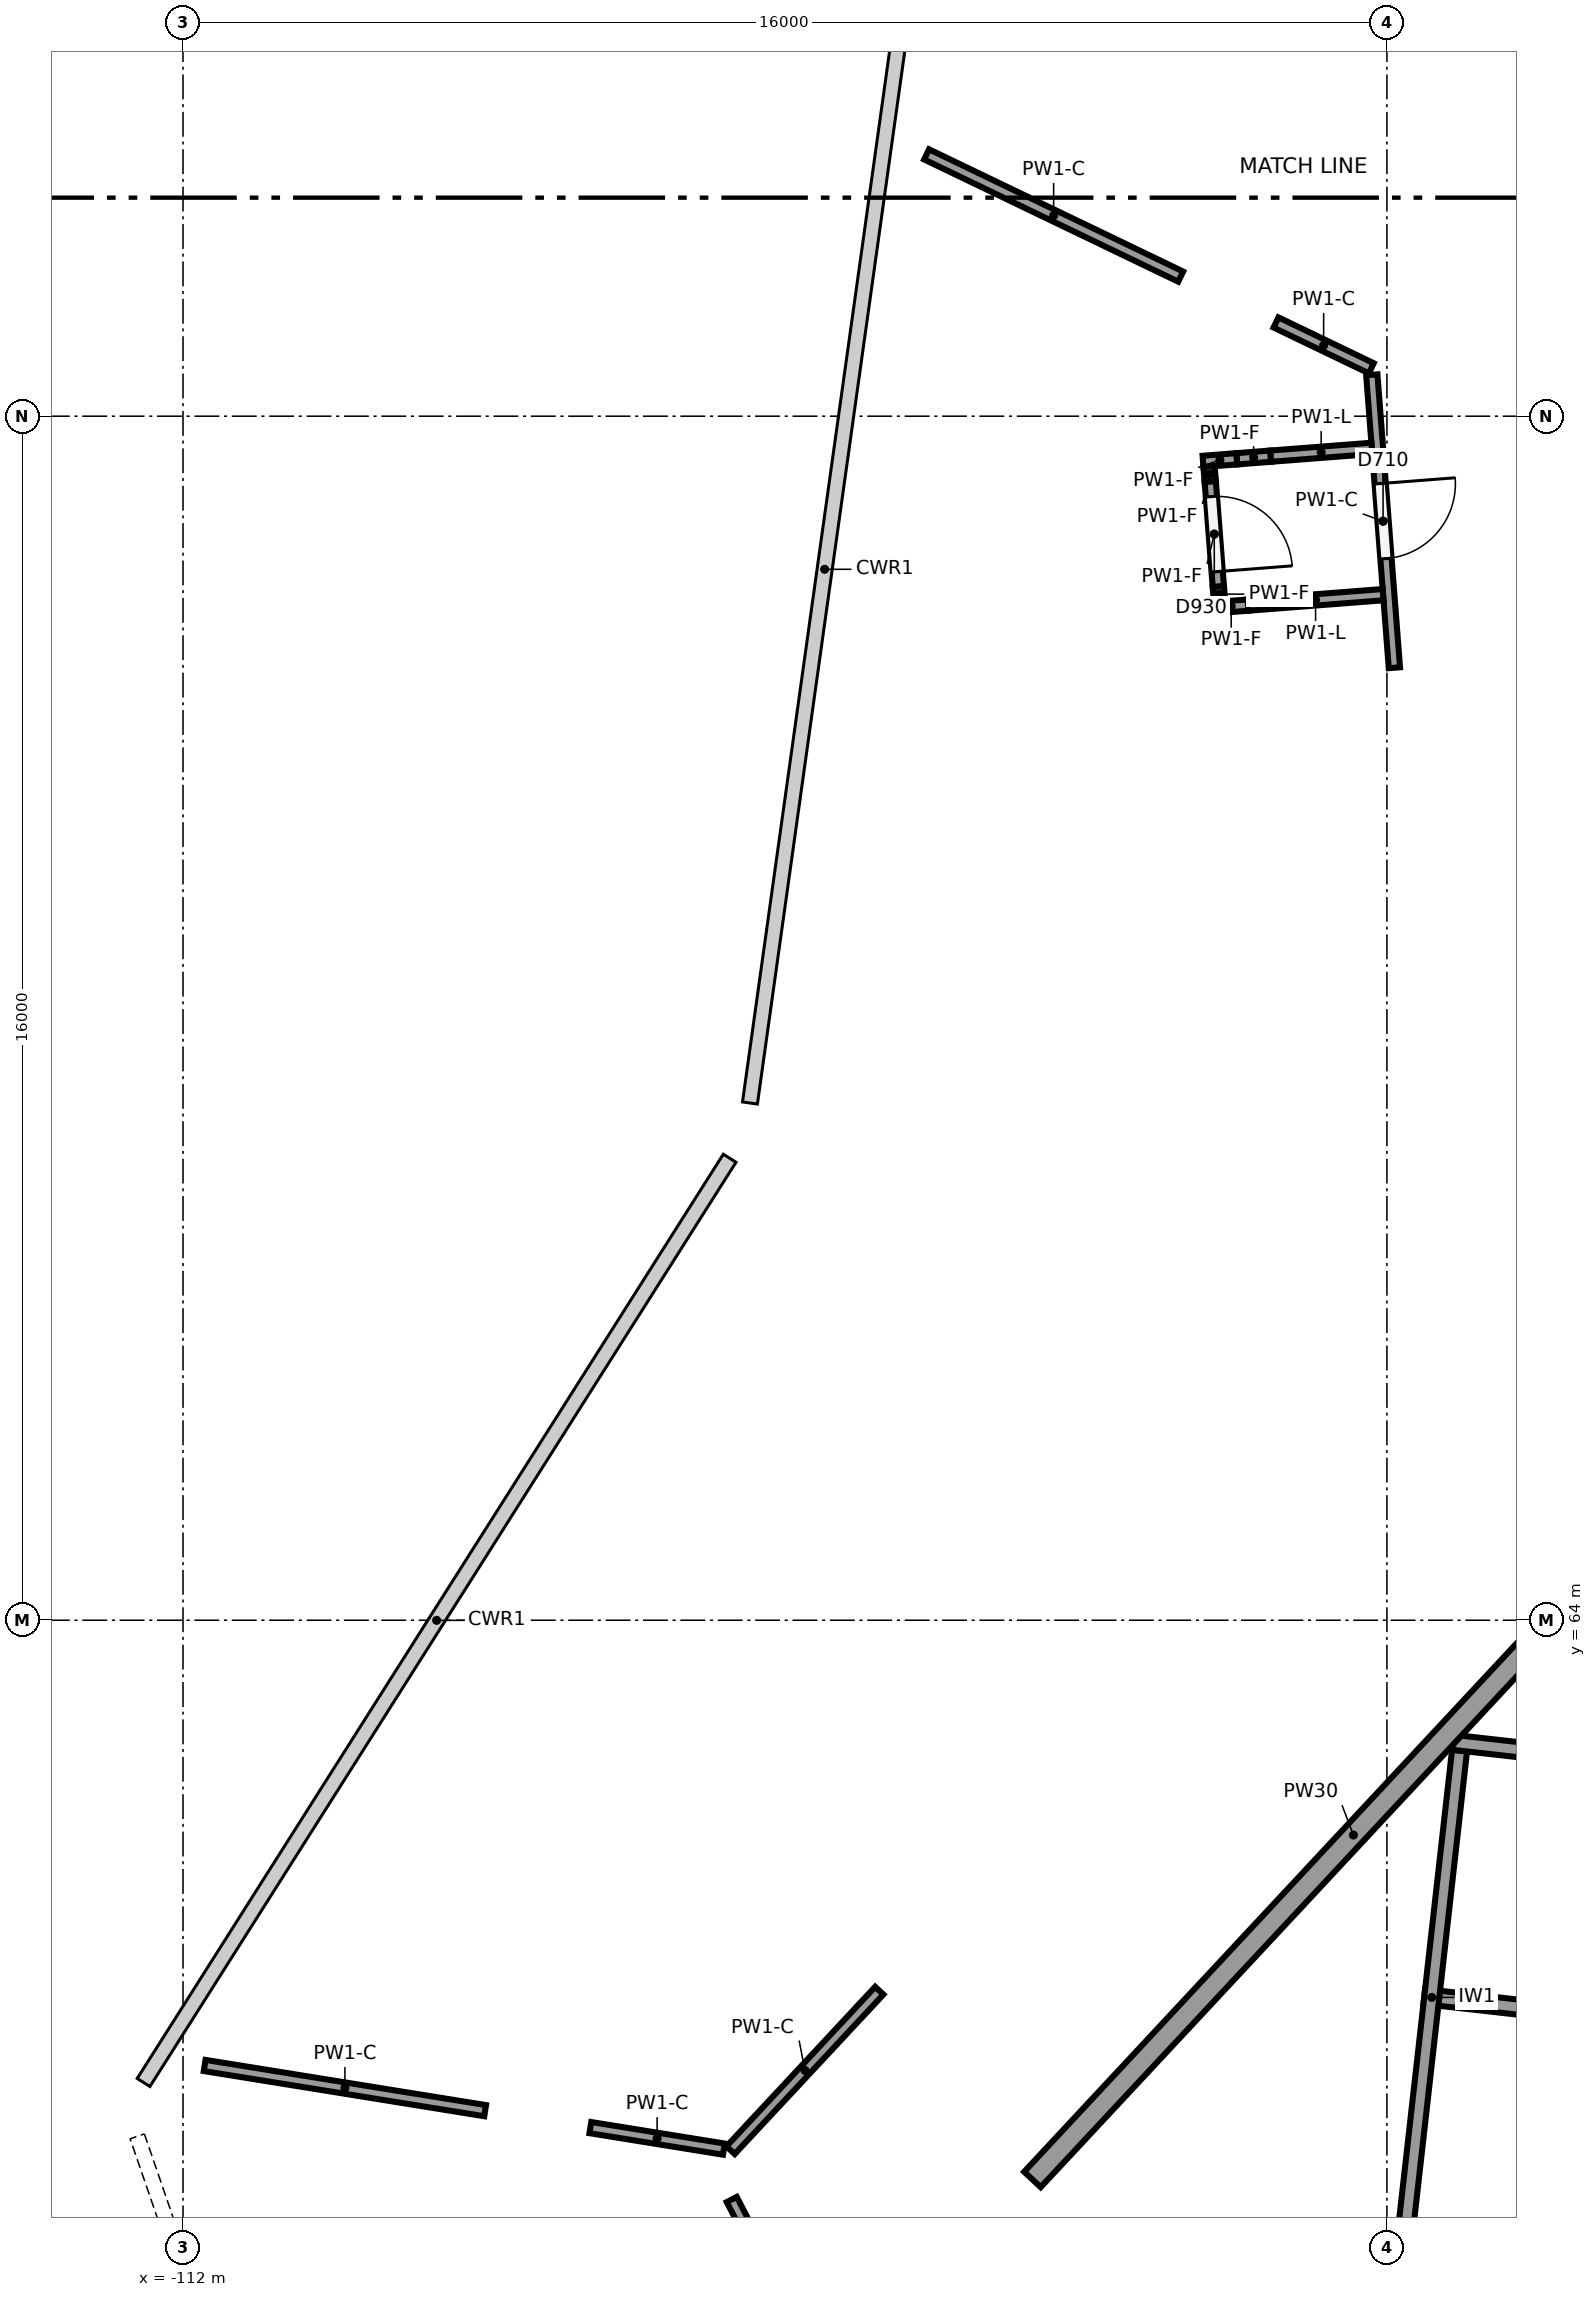
"""IFC4 building model, lengths in metres.
Left out: names, types, materials, properties, quantities, classifications, styles, units other than length and angle.
Written with IfcOpenShell. Run it as: python <this file> out.ifc"""

import sys

from ifc_helpers import new_model, si_unit, direction, frame, frame_2d, origin, origin_2d, place, context, subcontext, project, spatial, rectangle, circle, extrude, element, fill, save


model = new_model("IFC4")
c1 = context("Model", 3, precision=1e-05, world=origin(), true_north=direction((0.0, 1.0)))
c2 = subcontext(c1, "Body", "Model", "MODEL_VIEW")
j1 = project(units=[si_unit("LENGTHUNIT", "METRE"), si_unit("PLANEANGLEUNIT", "RADIAN")], contexts=[c1])
p1 = place(None, origin())
s1 = spatial("IfcSite", under=j1, at=p1, CompositionType="ELEMENT")
p2 = place(p1, origin())
s2 = spatial("IfcBuilding", under=s1, at=p2, CompositionType="ELEMENT")
p3 = place(p2, frame((0.0, 0.0, 12.0)))
s3 = spatial("IfcBuildingStorey", under=s2, at=p3, CompositionType="ELEMENT", Elevation=12.0)
p4 = place(p3, frame((-101.052, 56.203, 0.0), z_axis=(0.0, 0.0, 1.0), x_axis=(1.0, 0.0, 0.0)))
e1 = element("IfcColumn", 1, at=p4, inside=s3, PredefinedType="COLUMN", context=c2, shape_type="SweptSolid", body=[
    extrude(circle(Radius=0.5, at=origin_2d()), origin(), (0.0, 0.0, 1.0), 6.0),
])
for number, where, z_axis, x_axis in (
    (2, (-95.38, 81.028, 0.0), (0.0, 0.0, 1.0), (1.0, 0.0, 0.0)),
    (3, (-97.852, 82.581, 0.0), (0.0, 0.0, 1.0), (1.0, 0.0, 0.0)),
    (4, (-95.648, 67.373, 0.0), (0.0, 0.0, 1.0), (1.0, 0.0, 0.0)),
    (5, (-99.424, 68.694, 0.0), (0.0, 0.0, 1.0), (1.0, 0.0, 0.0)),
    (6, (-104.521, 70.477, 0.0), (0.0, 0.0, 1.0), (1.0, 0.0, 0.0)),
    (7, (-104.212, 56.559, 0.0), (0.0, 0.0, 1.0), (1.0, 0.0, 0.0)),
    (8, (-107.372, 56.915, 0.0), (0.0, 0.0, 1.0), (1.0, 0.0, 0.0)),
    (9, (-112.738, 57.52, 0.0), (0.0, 0.0, 1.0), (1.0, 0.0, 0.0)),
):
    element("IfcColumn", number, at=place(p3, frame(where, z_axis=z_axis, x_axis=x_axis)), inside=s3, PredefinedType="COLUMN", context=c2, shape_type="SweptSolid", body=[
        extrude(circle(Radius=0.4, at=origin_2d()), origin(), (0.0, 0.0, 1.0), 6.0),
    ])
p5 = place(p3, frame((-100.711, 56.568, 0.0), z_axis=(0.0, 0.0, 1.0), x_axis=(0.681794658463, 0.731543603411, 0.0)))
e10 = element("IfcWall", 10, at=p5, inside=s3, PredefinedType="SOLIDWALL", context=c2, shape_type="SweptSolid", body=[
    extrude(rectangle(XDim=12.514, YDim=0.3, at=frame_2d((6.257, 0.0))), origin(), (0.0, 0.0, 1.0), 4.35),
])
p6 = place(p3, frame((-95.123, 62.378, 0.0), z_axis=(0.0, 0.0, 1.0), x_axis=(0.993710792168, -0.111977058046, 0.0)))
e11 = element("IfcWall", 11, at=p6, inside=s3, PredefinedType="SHEAR", context=c2, shape_type="SweptSolid", body=[
    extrude(rectangle(XDim=8.2, YDim=0.2, at=frame_2d((4.1, 0.0))), origin(), (0.0, 0.0, 1.0), 5.65),
])
p7 = place(p3, frame((-95.035, 62.267, 0.0), z_axis=(0.0, 0.0, 1.0), x_axis=(-0.111933579504, -0.993715690617, 0.0)))
e12 = element("IfcWall", 12, at=p7, inside=s3, PredefinedType="SHEAR", context=c2, shape_type="SweptSolid", body=[
    extrude(rectangle(XDim=6.6, YDim=0.2, at=frame_2d((3.3, 0.0))), origin(), (0.0, 0.0, 1.0), 5.65),
])
p8 = place(p3, frame((-95.504, 58.999, 0.0), z_axis=(0.0, 0.0, 1.0), x_axis=(0.993710792168, -0.111977058046, 0.0)))
e13 = element("IfcWall", 13, at=p8, inside=s3, PredefinedType="SHEAR", context=c2, shape_type="SweptSolid", body=[
    extrude(rectangle(XDim=8.2, YDim=0.2, at=frame_2d((4.1, 0.0))), origin(), (0.0, 0.0, 1.0), 5.65),
])
p9 = place(p3, frame((-102.118, 83.479, 0.0), z_axis=(0.0, 0.0, 1.0), x_axis=(0.901188323719, -0.433427739298, 0.0)))
e14 = element("IfcWall", 14, at=p9, inside=s3, PredefinedType="PARTITIONING", context=c2, shape_type="SweptSolid", body=[
    extrude(rectangle(XDim=3.748, YDim=0.15, at=frame_2d((1.874, 0.0))), origin(), (0.0, 0.0, 1.0), 5.55),
])
p10 = place(p3, frame((-97.474, 81.246, 0.0), z_axis=(0.0, 0.0, 1.0), x_axis=(0.901167600811, -0.433470823988, 0.0)))
e15 = element("IfcWall", 15, at=p10, inside=s3, PredefinedType="PARTITIONING", context=c2, shape_type="SweptSolid", body=[
    extrude(rectangle(XDim=1.405, YDim=0.15, at=frame_2d((0.703, 0.0))), origin(), (0.0, 0.0, 1.0), 5.55),
])
p11 = place(p3, frame((-96.201, 80.55, 0.0), z_axis=(0.0, 0.0, 1.0), x_axis=(0.076969034149, -0.997033483782, 0.0)))
e16 = element("IfcWall", 16, at=p11, inside=s3, PredefinedType="PARTITIONING", context=c2, shape_type="SweptSolid", body=[
    extrude(rectangle(XDim=3.905, YDim=0.15, at=frame_2d((1.952, 0.0))), origin(), (0.0, 0.0, 1.0), 5.55),
])
p12 = place(p11, frame((1.45, 0.0, 0.0)))
e17 = element("IfcOpeningElement", 17, at=p12, cuts=e16, PredefinedType="OPENING", context=c2, shape_type="SweptSolid", body=[
    extrude(rectangle(XDim=1.0, YDim=2.1, at=frame_2d((0.5, 1.05))), frame((0.0, 0.085, 0.0), z_axis=(0.0, -1.0, 0.0), x_axis=(1.0, 0.0, 0.0)), (0.0, 0.0, 1.0), 0.17),
])
p13 = place(p3, frame((-102.747, 59.078, 0.0), z_axis=(0.0, 0.0, 1.0), x_axis=(-0.681777855642, -0.731559263188, 0.0)))
e18 = element("IfcWall", 18, at=p13, inside=s3, PredefinedType="PARTITIONING", context=c2, shape_type="SweptSolid", body=[
    extrude(rectangle(XDim=2.898, YDim=0.15, at=frame_2d((1.449, 0.0))), origin(), (0.0, 0.0, 1.0), 5.55),
])
p14 = place(p3, frame((-104.812, 56.972, 0.0), z_axis=(0.0, 0.0, 1.0), x_axis=(-0.987274842255, 0.159023224248, 0.0)))
e19 = element("IfcWall", 19, at=p14, inside=s3, PredefinedType="PARTITIONING", context=c2, shape_type="SweptSolid", body=[
    extrude(rectangle(XDim=1.798, YDim=0.15, at=frame_2d((0.899, 0.0))), origin(), (0.0, 0.0, 1.0), 5.55),
])
p15 = place(p3, frame((-107.985, 57.483, 0.0), z_axis=(0.0, 0.0, 1.0), x_axis=(-0.987279127288, 0.158996618901, 0.0)))
e20 = element("IfcWall", 20, at=p15, inside=s3, PredefinedType="PARTITIONING", context=c2, shape_type="SweptSolid", body=[
    extrude(rectangle(XDim=3.776, YDim=0.15, at=frame_2d((1.888, 0.0))), origin(), (0.0, 0.0, 1.0), 5.55),
])
p16 = place(p3, frame((-104.707, 56.302, 0.0), z_axis=(0.0, 0.0, 1.0), x_axis=(0.459976248991, -0.887931219388, 0.0)))
e21 = element("IfcWall", 21, at=p16, inside=s3, PredefinedType="PARTITIONING", context=c2, shape_type="SweptSolid", body=[
    extrude(rectangle(XDim=1.944, YDim=0.15, at=frame_2d((0.972, 0.0))), origin(), (0.0, 0.0, 1.0), 5.55),
])
p17 = place(p3, frame((-96.201, 79.573, 0.0), z_axis=(0.0, 0.0, 1.0), x_axis=(-0.997028903068, -0.077028348333, 0.0)))
e22 = element("IfcWall", 22, at=p17, inside=s3, PredefinedType="PARTITIONING", context=c2, shape_type="SweptSolid", body=[
    extrude(rectangle(XDim=1.35, YDim=0.15, at=frame_2d((0.675, 0.0))), origin(), (0.0, 0.0, 1.0), 5.6),
])
p18 = place(p3, frame((-97.547, 79.469, 0.0), z_axis=(0.0, 0.0, 1.0), x_axis=(-0.997070419096, -0.076489080029, 0.0)))
e23 = element("IfcWall", 23, at=p18, inside=s3, PredefinedType="PARTITIONING", context=c2, shape_type="SweptSolid", body=[
    extrude(rectangle(XDim=0.45, YDim=0.15, at=frame_2d((0.225, 0.0))), origin(), (0.0, 0.0, 1.0), 4.3),
])
p19 = place(p3, frame((-97.996, 79.434, 0.0), z_axis=(0.0, 0.0, 1.0), x_axis=(-0.997025681882, -0.077070030935, 0.0)))
e24 = element("IfcWall", 24, at=p19, inside=s3, PredefinedType="PARTITIONING", context=c2, shape_type="SweptSolid", body=[
    extrude(rectangle(XDim=0.45, YDim=0.15, at=frame_2d((0.225, 0.0))), origin(), (0.0, 0.0, 1.0), 4.3),
])
p20 = place(p3, frame((-96.051, 77.628, 0.0), z_axis=(0.0, 0.0, 1.0), x_axis=(-0.997028098262, -0.077038764768, 0.0)))
e25 = element("IfcWall", 25, at=p20, inside=s3, PredefinedType="PARTITIONING", context=c2, shape_type="SweptSolid", body=[
    extrude(rectangle(XDim=1.8, YDim=0.15, at=frame_2d((0.9, 0.0))), origin(), (0.0, 0.0, 1.0), 5.6),
])
p21 = place(p3, frame((-97.845, 77.49, 0.0), z_axis=(0.0, 0.0, 1.0), x_axis=(-0.997028903068, -0.077028348333, 0.0)))
e26 = element("IfcWall", 26, at=p21, inside=s3, PredefinedType="PARTITIONING", context=c2, shape_type="SweptSolid", body=[
    extrude(rectangle(XDim=0.45, YDim=0.15, at=frame_2d((0.225, 0.0))), origin(), (0.0, 0.0, 1.0), 4.3),
])
p22 = place(p3, frame((-98.364, 79.33, 0.0), z_axis=(0.0, 0.0, 1.0), x_axis=(0.076883141957, -0.997040110769, 0.0)))
e27 = element("IfcWall", 27, at=p22, inside=s3, PredefinedType="PARTITIONING", context=c2, shape_type="SweptSolid", body=[
    extrude(rectangle(XDim=0.2, YDim=0.15, at=frame_2d((0.1, 0.0))), origin(), (0.0, 0.0, 1.0), 4.3),
])
p23 = place(p3, frame((-98.348, 79.131, 0.0), z_axis=(0.0, 0.0, 1.0), x_axis=(0.076909879213, -0.997038048662, 0.0)))
e28 = element("IfcWall", 28, at=p23, inside=s3, PredefinedType="PARTITIONING", context=c2, shape_type="SweptSolid", body=[
    extrude(rectangle(XDim=1.4, YDim=0.15, at=frame_2d((0.7, 0.0))), origin(), (0.0, 0.0, 1.0), 4.3),
])
p24 = place(p23, frame((0.2, 0.0, 0.0)))
e29 = element("IfcOpeningElement", 29, at=p24, cuts=e28, PredefinedType="OPENING", context=c2, shape_type="SweptSolid", body=[
    extrude(rectangle(XDim=1.0, YDim=2.1, at=frame_2d((0.5, 1.05))), frame((0.0, 0.085, 0.0), z_axis=(0.0, -1.0, 0.0), x_axis=(1.0, 0.0, 0.0)), (0.0, 0.0, 1.0), 0.17),
])
p25 = place(p3, frame((-98.24, 77.735, 0.0), z_axis=(0.0, 0.0, 1.0), x_axis=(0.076883141957, -0.997040110769, 0.0)))
e30 = element("IfcWall", 30, at=p25, inside=s3, PredefinedType="PARTITIONING", context=c2, shape_type="SweptSolid", body=[
    extrude(rectangle(XDim=0.2, YDim=0.15, at=frame_2d((0.1, 0.0))), origin(), (0.0, 0.0, 1.0), 4.3),
])
p26 = place(p12, origin())
e31 = element("IfcDoor", 31, at=p26, inside=s3, OperationType="SINGLE_SWING_LEFT", PredefinedType="DOOR", context=c2, shape_type="SweptSolid", body=[
    extrude(rectangle(XDim=1.0, YDim=2.1, at=frame_2d((0.5, 1.05))), frame((0.0, 0.025, 0.0), z_axis=(0.0, -1.0, 0.0), x_axis=(1.0, 0.0, 0.0)), (0.0, 0.0, 1.0), 0.05),
])
fill(e17, e31)
p27 = place(p24, origin())
e32 = element("IfcDoor", 32, at=p27, inside=s3, OperationType="SINGLE_SWING_RIGHT", PredefinedType="DOOR", context=c2, shape_type="SweptSolid", body=[
    extrude(rectangle(XDim=1.0, YDim=2.1, at=frame_2d((0.5, 1.05))), frame((0.0, 0.025, 0.0), z_axis=(0.0, -1.0, 0.0), x_axis=(1.0, 0.0, 0.0)), (0.0, 0.0, 1.0), 0.05),
])
fill(e29, e32)
save(model, sys.argv[1])
